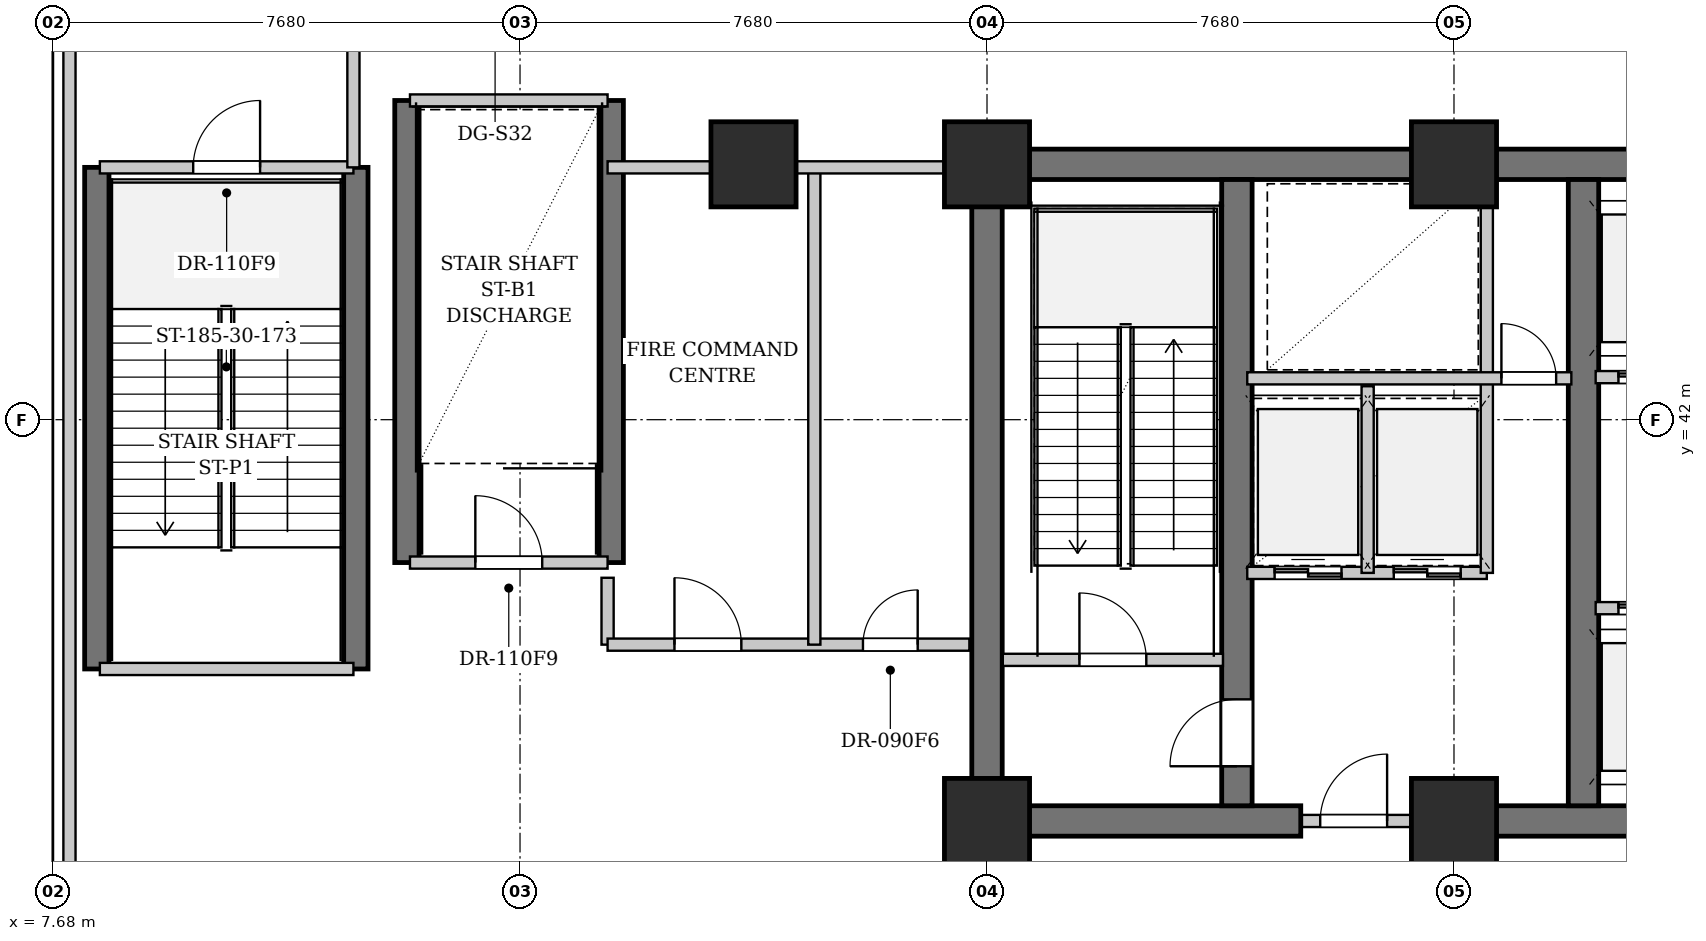
"""IFC4 building model, lengths in metres.
Left out: names, types, materials, properties, quantities, classifications, styles, units other than length and angle.
Written with IfcOpenShell. Run it as: python <this file> out.ifc"""

import sys

from ifc_helpers import new_model, si_unit, direction, frame, frame_2d, origin, origin_2d, place, context, subcontext, project, spatial, rectangle, extrude, element, fill, save


model = new_model("IFC4")
c1 = context("Model", 3, precision=1e-05, world=origin(), true_north=direction((0.0, 1.0)))
c2 = subcontext(c1, "Body", "Model", "MODEL_VIEW")
j1 = project(units=[si_unit("LENGTHUNIT", "METRE"), si_unit("PLANEANGLEUNIT", "RADIAN")], contexts=[c1])
p1 = place(None, origin())
s1 = spatial("IfcSite", under=j1, at=p1, CompositionType="ELEMENT")
p2 = place(p1, origin())
s2 = spatial("IfcBuilding", under=s1, at=p2, CompositionType="ELEMENT")
p3 = place(p2, origin())
s3 = spatial("IfcBuildingStorey", under=s2, at=p3, CompositionType="ELEMENT", Elevation=0.0)
p4 = place(p3, frame((22.79, 46.2, 0.0), z_axis=(0.0, 0.0, 1.0), x_axis=(1.0, 0.0, 0.0)))
e1 = element("IfcWall", 1, at=p4, inside=s3, PredefinedType="SHEAR", context=c2, shape_type="SweptSolid", body=[
    extrude(rectangle(XDim=31.22, YDim=0.5, at=frame_2d((15.61, 0.0))), origin(), (0.0, 0.0, 1.0), 4.94),
])
p5 = place(p3, frame((22.79, 35.4, 0.0), z_axis=(0.0, 0.0, 1.0), x_axis=(1.0, 0.0, 0.0)))
e2 = element("IfcWall", 2, at=p5, inside=s3, PredefinedType="SHEAR", context=c2, shape_type="SweptSolid", body=[
    extrude(rectangle(XDim=5.41, YDim=0.5, at=frame_2d((2.705, 0.0))), origin(), (0.0, 0.0, 1.0), 4.94),
])
p6 = place(p3, frame((30.72, 35.4, 0.0), z_axis=(0.0, 0.0, 1.0), x_axis=(1.0, 0.0, 0.0)))
e3 = element("IfcWall", 3, at=p6, inside=s3, PredefinedType="SHEAR", context=c2, shape_type="SweptSolid", body=[
    extrude(rectangle(XDim=4.88, YDim=0.5, at=frame_2d((2.44, 0.0))), origin(), (0.0, 0.0, 1.0), 4.94),
])
p7 = place(p3, frame((23.04, 35.65, 0.0), z_axis=(0.0, 0.0, 1.0), x_axis=(0.0, 1.0, 0.0)))
e4 = element("IfcWall", 4, at=p7, inside=s3, PredefinedType="SHEAR", context=c2, shape_type="SweptSolid", body=[
    extrude(rectangle(XDim=10.3, YDim=0.5, at=frame_2d((5.15, 0.0))), origin(), (0.0, 0.0, 1.0), 4.94),
])
p8 = place(p3, frame((27.15, 35.65, 0.0), z_axis=(0.0, 0.0, 1.0), x_axis=(0.0, 1.0, 0.0)))
e5 = element("IfcWall", 5, at=p8, inside=s3, PredefinedType="SHEAR", context=c2, shape_type="SweptSolid", body=[
    extrude(rectangle(XDim=10.3, YDim=0.5, at=frame_2d((5.15, 0.0))), origin(), (0.0, 0.0, 1.0), 4.94),
])
p9 = place(p8, frame((0.65, 0.0, 0.0)))
e6 = element("IfcOpeningElement", 6, at=p9, cuts=e5, PredefinedType="OPENING", context=c2, shape_type="SweptSolid", body=[
    extrude(rectangle(XDim=1.1, YDim=2.15, at=frame_2d((0.55, 1.075))), frame((0.0, 0.26, 0.0), z_axis=(0.0, -1.0, 0.0), x_axis=(1.0, 0.0, 0.0)), (0.0, 0.0, 1.0), 0.52),
])
p10 = place(p3, frame((32.85, 35.65, 0.0), z_axis=(0.0, 0.0, 1.0), x_axis=(0.0, 1.0, 0.0)))
e7 = element("IfcWall", 7, at=p10, inside=s3, PredefinedType="SHEAR", context=c2, shape_type="SweptSolid", body=[
    extrude(rectangle(XDim=10.3, YDim=0.5, at=frame_2d((5.15, 0.0))), origin(), (0.0, 0.0, 1.0), 4.94),
])
for number, where, z_axis, x_axis in (
    (8, (8.4, 37.9, 0.0), (0.0, 0.0, 1.0), (0.0, 1.0, 0.0)),
    (9, (12.66, 37.9, 0.0), (0.0, 0.0, 1.0), (0.0, 1.0, 0.0)),
):
    element("IfcWall", number, at=place(p3, frame(where, z_axis=z_axis, x_axis=x_axis)), inside=s3, PredefinedType="SHEAR", context=c2, shape_type="SweptSolid", body=[
        extrude(rectangle(XDim=8.25, YDim=0.4, at=frame_2d((4.125, 0.0))), origin(), (0.0, 0.0, 1.0), 4.94),
    ])
for number, where, z_axis, x_axis in (
    (10, (13.5, 39.65, 0.0), (0.0, 0.0, 1.0), (0.0, 1.0, 0.0)),
    (11, (16.86, 39.65, 0.0), (0.0, 0.0, 1.0), (0.0, 1.0, 0.0)),
):
    element("IfcWall", number, at=place(p3, frame(where, z_axis=z_axis, x_axis=x_axis)), inside=s3, PredefinedType="SHEAR", context=c2, shape_type="SweptSolid", body=[
        extrude(rectangle(XDim=7.6, YDim=0.4, at=frame_2d((3.8, 0.0))), origin(), (0.0, 0.0, 1.0), 4.94),
    ])
for number, where, z_axis, x_axis in (
    (12, (23.04, 35.4, 0.0), (0.0, 0.0, 1.0), (1.0, 0.0, 0.0)),
    (13, (23.04, 46.2, 0.0), (0.0, 0.0, 1.0), (1.0, 0.0, 0.0)),
    (14, (30.72, 35.4, 0.0), (0.0, 0.0, 1.0), (1.0, 0.0, 0.0)),
    (15, (30.72, 46.2, 0.0), (0.0, 0.0, 1.0), (1.0, 0.0, 0.0)),
    (16, (19.2, 46.2, 0.0), (0.0, 0.0, 1.0), (1.0, 0.0, 0.0)),
):
    element("IfcColumn", number, at=place(p3, frame(where, z_axis=z_axis, x_axis=x_axis)), inside=s3, PredefinedType="COLUMN", context=c2, shape_type="SweptSolid", body=[
        extrude(rectangle(XDim=1.4, YDim=1.4, at=origin_2d()), origin(), (0.0, 0.0, 1.0), 5.2),
    ])
p11 = place(p3, frame((23.3, 38.05, 0.0), z_axis=(0.0, 0.0, 1.0), x_axis=(1.0, 0.0, 0.0)))
e17 = element("IfcWall", 17, at=p11, inside=s3, PredefinedType="PARTITIONING", context=c2, shape_type="SweptSolid", body=[
    extrude(rectangle(XDim=3.62, YDim=0.2, at=frame_2d((1.81, 0.0))), origin(), (0.0, 0.0, 1.0), 4.94),
])
p12 = place(p11, frame((1.26, 0.0, 0.0)))
e18 = element("IfcOpeningElement", 18, at=p12, cuts=e17, PredefinedType="OPENING", context=c2, shape_type="SweptSolid", body=[
    extrude(rectangle(XDim=1.1, YDim=2.15, at=frame_2d((0.55, 1.075))), frame((0.0, 0.11, 0.0), z_axis=(0.0, -1.0, 0.0), x_axis=(1.0, 0.0, 0.0)), (0.0, 0.0, 1.0), 0.22),
])
p13 = place(p3, frame((28.22, 35.4, 0.0), z_axis=(0.0, 0.0, 1.0), x_axis=(1.0, 0.0, 0.0)))
e19 = element("IfcWall", 19, at=p13, inside=s3, PredefinedType="PARTITIONING", context=c2, shape_type="SweptSolid", body=[
    extrude(rectangle(XDim=2.5, YDim=0.2, at=frame_2d((1.25, 0.0))), origin(), (0.0, 0.0, 1.0), 3.935),
])
p14 = place(p13, frame((0.3, 0.0, 0.0)))
e20 = element("IfcOpeningElement", 20, at=p14, cuts=e19, PredefinedType="OPENING", context=c2, shape_type="SweptSolid", body=[
    extrude(rectangle(XDim=1.1, YDim=2.15, at=frame_2d((0.55, 1.075))), frame((0.0, 0.11, 0.0), z_axis=(0.0, -1.0, 0.0), x_axis=(1.0, 0.0, 0.0)), (0.0, 0.0, 1.0), 0.22),
])
p15 = place(p3, frame((27.32, 39.48, 0.0), z_axis=(0.0, 0.0, 1.0), x_axis=(1.0, 0.0, 0.0)))
e21 = element("IfcWall", 21, at=p15, inside=s3, PredefinedType="PARTITIONING", context=c2, shape_type="SweptSolid", body=[
    extrude(rectangle(XDim=3.94, YDim=0.2, at=frame_2d((1.97, 0.0))), origin(), (0.0, 0.0, 1.0), 4.94),
])
p16 = place(p15, frame((0.45, 0.0, 0.0)))
e22 = element("IfcOpeningElement", 22, at=p16, cuts=e21, PredefinedType="OPENING", context=c2, shape_type="SweptSolid", body=[
    extrude(rectangle(XDim=1.1, YDim=2.2, at=frame_2d((0.55, 1.1))), frame((0.0, 0.11, 0.0), z_axis=(0.0, -1.0, 0.0), x_axis=(1.0, 0.0, 0.0)), (0.0, 0.0, 1.0), 0.22),
])
p17 = place(p15, frame((2.41, 0.0, 0.0)))
e23 = element("IfcOpeningElement", 23, at=p17, cuts=e21, PredefinedType="OPENING", context=c2, shape_type="SweptSolid", body=[
    extrude(rectangle(XDim=1.1, YDim=2.2, at=frame_2d((0.55, 1.1))), frame((0.0, 0.11, 0.0), z_axis=(0.0, -1.0, 0.0), x_axis=(1.0, 0.0, 0.0)), (0.0, 0.0, 1.0), 0.22),
])
p18 = place(p3, frame((29.3, 39.48, 0.0), z_axis=(0.0, 0.0, 1.0), x_axis=(0.0, 1.0, 0.0)))
e24 = element("IfcWall", 24, at=p18, inside=s3, PredefinedType="PARTITIONING", context=c2, shape_type="SweptSolid", body=[
    extrude(rectangle(XDim=3.07, YDim=0.2, at=frame_2d((1.535, 0.0))), origin(), (0.0, 0.0, 1.0), 4.94),
])
p19 = place(p3, frame((31.26, 39.48, 0.0), z_axis=(0.0, 0.0, 1.0), x_axis=(0.0, 1.0, 0.0)))
e25 = element("IfcWall", 25, at=p19, inside=s3, PredefinedType="PARTITIONING", context=c2, shape_type="SweptSolid", body=[
    extrude(rectangle(XDim=6.44, YDim=0.2, at=frame_2d((3.22, 0.0))), origin(), (0.0, 0.0, 1.0), 4.94),
])
p20 = place(p3, frame((27.32, 42.68, 0.0), z_axis=(0.0, 0.0, 1.0), x_axis=(1.0, 0.0, 0.0)))
e26 = element("IfcWall", 26, at=p20, inside=s3, PredefinedType="PARTITIONING", context=c2, shape_type="SweptSolid", body=[
    extrude(rectangle(XDim=5.33, YDim=0.2, at=frame_2d((2.665, 0.0))), origin(), (0.0, 0.0, 1.0), 4.94),
])
p21 = place(p20, frame((4.18, 0.0, 0.0)))
e27 = element("IfcOpeningElement", 27, at=p21, cuts=e26, PredefinedType="OPENING", context=c2, shape_type="SweptSolid", body=[
    extrude(rectangle(XDim=0.9, YDim=2.15, at=frame_2d((0.45, 1.075))), frame((0.0, 0.11, 0.0), z_axis=(0.0, -1.0, 0.0), x_axis=(1.0, 0.0, 0.0)), (0.0, 0.0, 1.0), 0.22),
])
p22 = place(p3, frame((33.05, 38.9, 0.0), z_axis=(0.0, 0.0, 1.0), x_axis=(1.0, 0.0, 0.0)))
e28 = element("IfcWall", 28, at=p22, inside=s3, PredefinedType="PARTITIONING", context=c2, shape_type="SweptSolid", body=[
    extrude(rectangle(XDim=3.57, YDim=0.2, at=frame_2d((1.785, 0.0))), origin(), (0.0, 0.0, 1.0), 4.94),
])
p23 = place(p22, frame((0.375, 0.0, 0.0)))
e29 = element("IfcOpeningElement", 29, at=p23, cuts=e28, PredefinedType="OPENING", context=c2, shape_type="SweptSolid", body=[
    extrude(rectangle(XDim=1.0, YDim=2.2, at=frame_2d((0.5, 1.1))), frame((0.0, 0.11, 0.0), z_axis=(0.0, -1.0, 0.0), x_axis=(1.0, 0.0, 0.0)), (0.0, 0.0, 1.0), 0.22),
])
p24 = place(p22, frame((2.125, 0.0, 0.0)))
e30 = element("IfcOpeningElement", 30, at=p24, cuts=e28, PredefinedType="OPENING", context=c2, shape_type="SweptSolid", body=[
    extrude(rectangle(XDim=1.0, YDim=2.2, at=frame_2d((0.5, 1.1))), frame((0.0, 0.11, 0.0), z_axis=(0.0, -1.0, 0.0), x_axis=(1.0, 0.0, 0.0)), (0.0, 0.0, 1.0), 0.22),
])
p25 = place(p3, frame((33.05, 42.7, 0.0), z_axis=(0.0, 0.0, 1.0), x_axis=(1.0, 0.0, 0.0)))
e31 = element("IfcWall", 31, at=p25, inside=s3, PredefinedType="PARTITIONING", context=c2, shape_type="SweptSolid", body=[
    extrude(rectangle(XDim=3.57, YDim=0.2, at=frame_2d((1.785, 0.0))), origin(), (0.0, 0.0, 1.0), 4.94),
])
p26 = place(p25, frame((0.375, 0.0, 0.0)))
e32 = element("IfcOpeningElement", 32, at=p26, cuts=e31, PredefinedType="OPENING", context=c2, shape_type="SweptSolid", body=[
    extrude(rectangle(XDim=1.0, YDim=2.2, at=frame_2d((0.5, 1.1))), frame((0.0, 0.11, 0.0), z_axis=(0.0, -1.0, 0.0), x_axis=(1.0, 0.0, 0.0)), (0.0, 0.0, 1.0), 0.22),
])
p27 = place(p25, frame((2.125, 0.0, 0.0)))
e33 = element("IfcOpeningElement", 33, at=p27, cuts=e31, PredefinedType="OPENING", context=c2, shape_type="SweptSolid", body=[
    extrude(rectangle(XDim=1.0, YDim=2.2, at=frame_2d((0.5, 1.1))), frame((0.0, 0.11, 0.0), z_axis=(0.0, -1.0, 0.0), x_axis=(1.0, 0.0, 0.0)), (0.0, 0.0, 1.0), 0.22),
])
p28 = place(p3, frame((8.45, 37.9, 0.0), z_axis=(0.0, 0.0, 1.0), x_axis=(1.0, 0.0, 0.0)))
e34 = element("IfcWall", 34, at=p28, inside=s3, PredefinedType="PARTITIONING", context=c2, shape_type="SweptSolid", body=[
    extrude(rectangle(XDim=4.17, YDim=0.2, at=frame_2d((2.085, 0.0))), origin(), (0.0, 0.0, 1.0), 4.94),
])
p29 = place(p3, frame((8.45, 46.15, 0.0), z_axis=(0.0, 0.0, 1.0), x_axis=(1.0, 0.0, 0.0)))
e35 = element("IfcWall", 35, at=p29, inside=s3, PredefinedType="PARTITIONING", context=c2, shape_type="SweptSolid", body=[
    extrude(rectangle(XDim=4.17, YDim=0.2, at=frame_2d((2.085, 0.0))), origin(), (0.0, 0.0, 1.0), 4.94),
])
p30 = place(p29, frame((1.535, 0.0, 0.0)))
e36 = element("IfcOpeningElement", 36, at=p30, cuts=e35, PredefinedType="OPENING", context=c2, shape_type="SweptSolid", body=[
    extrude(rectangle(XDim=1.1, YDim=2.15, at=frame_2d((0.55, 1.075))), frame((0.0, 0.11, 0.0), z_axis=(0.0, -1.0, 0.0), x_axis=(1.0, 0.0, 0.0)), (0.0, 0.0, 1.0), 0.22),
])
p31 = place(p3, frame((7.95, 0.42, 0.0), z_axis=(0.0, 0.0, 1.0), x_axis=(0.0, 1.0, 0.0)))
e37 = element("IfcWall", 37, at=p31, inside=s3, PredefinedType="PARTITIONING", context=c2, shape_type="SweptSolid", body=[
    extrude(rectangle(XDim=49.56, YDim=0.2, at=frame_2d((24.78, 0.0))), origin(), (0.0, 0.0, 1.0), 4.94),
])
p32 = place(p31, frame((48.1, 0.0, 0.0)))
e38 = element("IfcOpeningElement", 38, at=p32, cuts=e37, PredefinedType="OPENING", context=c2, shape_type="SweptSolid", body=[
    extrude(rectangle(XDim=1.1, YDim=2.15, at=frame_2d((0.55, 1.075))), frame((0.0, 0.11, 0.0), z_axis=(0.0, -1.0, 0.0), x_axis=(1.0, 0.0, 0.0)), (0.0, 0.0, 1.0), 0.22),
])
p33 = place(p3, frame((12.62, 46.15, 0.0), z_axis=(0.0, 0.0, 1.0), x_axis=(0.0, 1.0, 0.0)))
e39 = element("IfcWall", 39, at=p33, inside=s3, PredefinedType="PARTITIONING", context=c2, shape_type="SweptSolid", body=[
    extrude(rectangle(XDim=4.07, YDim=0.2, at=frame_2d((2.035, 0.0))), origin(), (0.0, 0.0, 1.0), 4.94),
])
p34 = place(p3, frame((13.55, 47.25, 0.0), z_axis=(0.0, 0.0, 1.0), x_axis=(1.0, 0.0, 0.0)))
e40 = element("IfcWall", 40, at=p34, inside=s3, PredefinedType="PARTITIONING", context=c2, shape_type="SweptSolid", body=[
    extrude(rectangle(XDim=3.25, YDim=0.2, at=frame_2d((1.625, 0.0))), origin(), (0.0, 0.0, 1.0), 4.94),
])
p35 = place(p3, frame((13.55, 39.65, 0.0), z_axis=(0.0, 0.0, 1.0), x_axis=(1.0, 0.0, 0.0)))
e41 = element("IfcWall", 41, at=p35, inside=s3, PredefinedType="PARTITIONING", context=c2, shape_type="SweptSolid", body=[
    extrude(rectangle(XDim=3.25, YDim=0.2, at=frame_2d((1.625, 0.0))), origin(), (0.0, 0.0, 1.0), 4.94),
])
p36 = place(p35, frame((1.075, 0.0, 0.0)))
e42 = element("IfcOpeningElement", 42, at=p36, cuts=e41, PredefinedType="OPENING", context=c2, shape_type="SweptSolid", body=[
    extrude(rectangle(XDim=1.1, YDim=2.15, at=frame_2d((0.55, 1.075))), frame((0.0, 0.11, 0.0), z_axis=(0.0, -1.0, 0.0), x_axis=(1.0, 0.0, 0.0)), (0.0, 0.0, 1.0), 0.22),
])
p37 = place(p3, frame((16.8, 38.3, 0.0), z_axis=(0.0, 0.0, 1.0), x_axis=(0.0, 1.0, 0.0)))
e43 = element("IfcWall", 43, at=p37, inside=s3, PredefinedType="PARTITIONING", context=c2, shape_type="SweptSolid", body=[
    extrude(rectangle(XDim=1.1, YDim=0.2, at=frame_2d((0.55, 0.0))), origin(), (0.0, 0.0, 1.0), 4.94),
])
p38 = place(p3, frame((16.8, 38.3, 0.0), z_axis=(0.0, 0.0, 1.0), x_axis=(1.0, 0.0, 0.0)))
e44 = element("IfcWall", 44, at=p38, inside=s3, PredefinedType="PARTITIONING", context=c2, shape_type="SweptSolid", body=[
    extrude(rectangle(XDim=5.95, YDim=0.2, at=frame_2d((2.975, 0.0))), origin(), (0.0, 0.0, 1.0), 4.94),
])
p39 = place(p38, frame((1.1, 0.0, 0.0)))
e45 = element("IfcOpeningElement", 45, at=p39, cuts=e44, PredefinedType="OPENING", context=c2, shape_type="SweptSolid", body=[
    extrude(rectangle(XDim=1.1, YDim=2.15, at=frame_2d((0.55, 1.075))), frame((0.0, 0.11, 0.0), z_axis=(0.0, -1.0, 0.0), x_axis=(1.0, 0.0, 0.0)), (0.0, 0.0, 1.0), 0.22),
])
p40 = place(p38, frame((4.2, 0.0, 0.0)))
e46 = element("IfcOpeningElement", 46, at=p40, cuts=e44, PredefinedType="OPENING", context=c2, shape_type="SweptSolid", body=[
    extrude(rectangle(XDim=0.9, YDim=2.15, at=frame_2d((0.45, 1.075))), frame((0.0, 0.11, 0.0), z_axis=(0.0, -1.0, 0.0), x_axis=(1.0, 0.0, 0.0)), (0.0, 0.0, 1.0), 0.22),
])
p41 = place(p3, frame((20.2, 38.3, 0.0), z_axis=(0.0, 0.0, 1.0), x_axis=(0.0, 1.0, 0.0)))
e47 = element("IfcWall", 47, at=p41, inside=s3, PredefinedType="PARTITIONING", context=c2, shape_type="SweptSolid", body=[
    extrude(rectangle(XDim=7.85, YDim=0.2, at=frame_2d((3.925, 0.0))), origin(), (0.0, 0.0, 1.0), 4.94),
])
p42 = place(p3, frame((16.8, 46.15, 0.0), z_axis=(0.0, 0.0, 1.0), x_axis=(1.0, 0.0, 0.0)))
e48 = element("IfcWall", 48, at=p42, inside=s3, PredefinedType="PARTITIONING", context=c2, shape_type="SweptSolid", body=[
    extrude(rectangle(XDim=5.95, YDim=0.2, at=frame_2d((2.975, 0.0))), origin(), (0.0, 0.0, 1.0), 4.94),
])
p43 = place(p12, origin())
e49 = element("IfcDoor", 49, at=p43, inside=s3, OperationType="SINGLE_SWING_LEFT", PredefinedType="DOOR", context=c2, shape_type="SweptSolid", body=[
    extrude(rectangle(XDim=1.1, YDim=2.15, at=frame_2d((0.55, 1.075))), frame((0.0, 0.025, 0.0), z_axis=(0.0, -1.0, 0.0), x_axis=(1.0, 0.0, 0.0)), (0.0, 0.0, 1.0), 0.05),
])
fill(e18, e49)
p44 = place(p14, origin())
e50 = element("IfcDoor", 50, at=p44, inside=s3, OperationType="SINGLE_SWING_RIGHT", PredefinedType="DOOR", context=c2, shape_type="SweptSolid", body=[
    extrude(rectangle(XDim=1.1, YDim=2.15, at=frame_2d((0.55, 1.075))), frame((0.0, 0.025, 0.0), z_axis=(0.0, -1.0, 0.0), x_axis=(1.0, 0.0, 0.0)), (0.0, 0.0, 1.0), 0.05),
])
fill(e20, e50)
p45 = place(p16, origin())
e51 = element("IfcDoor", 51, at=p45, inside=s3, OperationType="DOUBLE_DOOR_SLIDING", PredefinedType="DOOR", context=c2, shape_type="SweptSolid", body=[
    extrude(rectangle(XDim=1.1, YDim=2.2, at=frame_2d((0.55, 1.1))), frame((0.0, 0.025, 0.0), z_axis=(0.0, -1.0, 0.0), x_axis=(1.0, 0.0, 0.0)), (0.0, 0.0, 1.0), 0.05),
])
fill(e22, e51)
p46 = place(p17, origin())
e52 = element("IfcDoor", 52, at=p46, inside=s3, OperationType="DOUBLE_DOOR_SLIDING", PredefinedType="DOOR", context=c2, shape_type="SweptSolid", body=[
    extrude(rectangle(XDim=1.1, YDim=2.2, at=frame_2d((0.55, 1.1))), frame((0.0, 0.025, 0.0), z_axis=(0.0, -1.0, 0.0), x_axis=(1.0, 0.0, 0.0)), (0.0, 0.0, 1.0), 0.05),
])
fill(e23, e52)
p47 = place(p21, origin())
e53 = element("IfcDoor", 53, at=p47, inside=s3, OperationType="SINGLE_SWING_LEFT", PredefinedType="DOOR", context=c2, shape_type="SweptSolid", body=[
    extrude(rectangle(XDim=0.9, YDim=2.15, at=frame_2d((0.45, 1.075))), frame((0.0, 0.025, 0.0), z_axis=(0.0, -1.0, 0.0), x_axis=(1.0, 0.0, 0.0)), (0.0, 0.0, 1.0), 0.05),
])
fill(e27, e53)
p48 = place(p23, origin())
e54 = element("IfcDoor", 54, at=p48, inside=s3, OperationType="DOUBLE_DOOR_SLIDING", PredefinedType="DOOR", context=c2, shape_type="SweptSolid", body=[
    extrude(rectangle(XDim=1.0, YDim=2.2, at=frame_2d((0.5, 1.1))), frame((0.0, 0.025, 0.0), z_axis=(0.0, -1.0, 0.0), x_axis=(1.0, 0.0, 0.0)), (0.0, 0.0, 1.0), 0.05),
])
fill(e29, e54)
p49 = place(p26, origin())
e55 = element("IfcDoor", 55, at=p49, inside=s3, OperationType="DOUBLE_DOOR_SLIDING", PredefinedType="DOOR", context=c2, shape_type="SweptSolid", body=[
    extrude(rectangle(XDim=1.0, YDim=2.2, at=frame_2d((0.5, 1.1))), frame((0.0, 0.025, 0.0), z_axis=(0.0, -1.0, 0.0), x_axis=(1.0, 0.0, 0.0)), (0.0, 0.0, 1.0), 0.05),
])
fill(e32, e55)
p50 = place(p30, origin())
e56 = element("IfcDoor", 56, at=p50, inside=s3, OperationType="SINGLE_SWING_RIGHT", PredefinedType="DOOR", context=c2, shape_type="SweptSolid", body=[
    extrude(rectangle(XDim=1.1, YDim=2.15, at=frame_2d((0.55, 1.075))), frame((0.0, 0.025, 0.0), z_axis=(0.0, -1.0, 0.0), x_axis=(1.0, 0.0, 0.0)), (0.0, 0.0, 1.0), 0.05),
])
fill(e36, e56)
p51 = place(p36, origin())
e57 = element("IfcDoor", 57, at=p51, inside=s3, OperationType="SINGLE_SWING_LEFT", PredefinedType="DOOR", context=c2, shape_type="SweptSolid", body=[
    extrude(rectangle(XDim=1.1, YDim=2.15, at=frame_2d((0.55, 1.075))), frame((0.0, 0.025, 0.0), z_axis=(0.0, -1.0, 0.0), x_axis=(1.0, 0.0, 0.0)), (0.0, 0.0, 1.0), 0.05),
])
fill(e42, e57)
p52 = place(p39, origin())
e58 = element("IfcDoor", 58, at=p52, inside=s3, OperationType="SINGLE_SWING_LEFT", PredefinedType="DOOR", context=c2, shape_type="SweptSolid", body=[
    extrude(rectangle(XDim=1.1, YDim=2.15, at=frame_2d((0.55, 1.075))), frame((0.0, 0.025, 0.0), z_axis=(0.0, -1.0, 0.0), x_axis=(1.0, 0.0, 0.0)), (0.0, 0.0, 1.0), 0.05),
])
fill(e45, e58)
p53 = place(p40, origin())
e59 = element("IfcDoor", 59, at=p53, inside=s3, OperationType="SINGLE_SWING_RIGHT", PredefinedType="DOOR", context=c2, shape_type="SweptSolid", body=[
    extrude(rectangle(XDim=0.9, YDim=2.15, at=frame_2d((0.45, 1.075))), frame((0.0, 0.025, 0.0), z_axis=(0.0, -1.0, 0.0), x_axis=(1.0, 0.0, 0.0)), (0.0, 0.0, 1.0), 0.05),
])
fill(e46, e59)
p54 = place(p9, origin())
e60 = element("IfcDoor", 60, at=p54, inside=s3, OperationType="SINGLE_SWING_LEFT", PredefinedType="DOOR", context=c2, shape_type="SweptSolid", body=[
    extrude(rectangle(XDim=1.1, YDim=2.15, at=frame_2d((0.55, 1.075))), frame((0.0, 0.025, 0.0), z_axis=(0.0, -1.0, 0.0), x_axis=(1.0, 0.0, 0.0)), (0.0, 0.0, 1.0), 0.05),
])
fill(e6, e60)
save(model, sys.argv[1])
